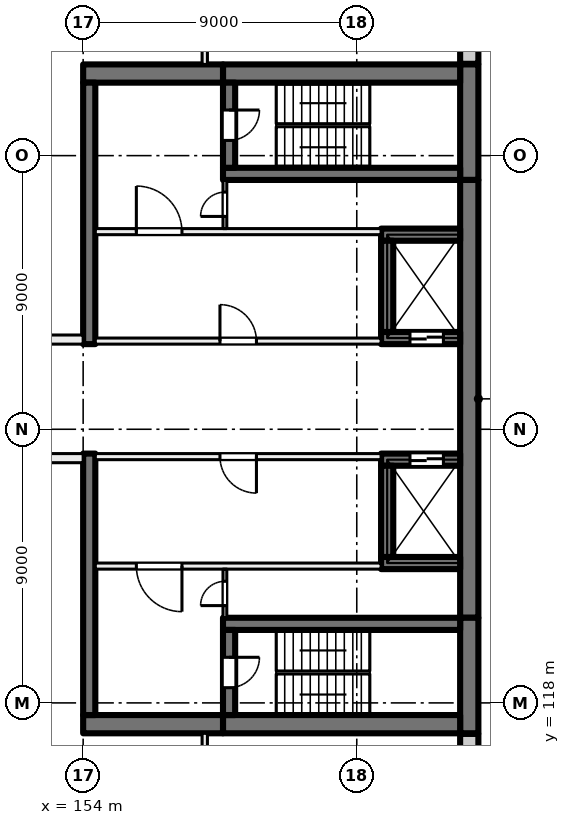
"""IFC4 building model, lengths in metres.
Left out: names, types, materials, properties, quantities, classifications, styles, units other than length and angle.
Written with IfcOpenShell. Run it as: python <this file> out.ifc"""

import sys

from ifc_helpers import new_model, si_unit, direction, frame, frame_2d, origin, place, context, subcontext, project, spatial, rectangle, extrude, element, fill, save


model = new_model("IFC4")
c1 = context("Model", 3, precision=1e-05, world=origin(), true_north=direction((0.0, 1.0)))
c2 = subcontext(c1, "Body", "Model", "MODEL_VIEW")
j1 = project(units=[si_unit("LENGTHUNIT", "METRE"), si_unit("PLANEANGLEUNIT", "RADIAN")], contexts=[c1])
p1 = place(None, origin())
s1 = spatial("IfcSite", under=j1, at=p1, CompositionType="ELEMENT")
p2 = place(p1, origin())
s2 = spatial("IfcBuilding", under=s1, at=p2, CompositionType="ELEMENT")
p3 = place(p2, frame((0.0, 0.0, 85.0)))
s3 = spatial("IfcBuildingStorey", under=s2, at=p3, CompositionType="ELEMENT", Elevation=85.0)
p4 = place(p3, frame((166.7, 139.0, 0.0), z_axis=(0.0, 0.0, 1.0), x_axis=(0.0, -1.0, 0.0)))
e1 = element("IfcWall", 1, at=p4, inside=s3, PredefinedType="SHEAR", context=c2, shape_type="SweptSolid", body=[
    extrude(rectangle(XDim=3.8, YDim=0.6, at=frame_2d((1.9, 0.0))), origin(), (0.0, 0.0, 1.0), 4.0),
])
p5 = place(p3, frame((166.7, 135.2, 0.0), z_axis=(0.0, 0.0, 1.0), x_axis=(0.0, -1.0, 0.0)))
e2 = element("IfcWall", 2, at=p5, inside=s3, PredefinedType="SHEAR", context=c2, shape_type="SweptSolid", body=[
    extrude(rectangle(XDim=14.4, YDim=0.6, at=frame_2d((7.2, 0.0))), origin(), (0.0, 0.0, 1.0), 4.0),
])
p6 = place(p3, frame((166.7, 120.8, 0.0), z_axis=(0.0, 0.0, 1.0), x_axis=(0.0, -1.0, 0.0)))
e3 = element("IfcWall", 3, at=p6, inside=s3, PredefinedType="SHEAR", context=c2, shape_type="SweptSolid", body=[
    extrude(rectangle(XDim=3.8, YDim=0.6, at=frame_2d((1.9, 0.0))), origin(), (0.0, 0.0, 1.0), 4.0),
])
for number, where, z_axis, x_axis in (
    (4, (166.4, 138.7, 0.0), (0.0, 0.0, 1.0), (-1.0, 0.0, 0.0)),
    (5, (166.4, 117.3, 0.0), (0.0, 0.0, 1.0), (-1.0, 0.0, 0.0)),
):
    element("IfcWall", number, at=place(p3, frame(where, z_axis=z_axis, x_axis=x_axis)), inside=s3, PredefinedType="SHEAR", context=c2, shape_type="SweptSolid", body=[
        extrude(rectangle(XDim=7.8, YDim=0.6, at=frame_2d((3.9, 0.0))), origin(), (0.0, 0.0, 1.0), 4.0),
    ])
for number, where, z_axis, x_axis in (
    (6, (158.6, 138.7, 0.0), (0.0, 0.0, 1.0), (-1.0, 0.0, 0.0)),
    (7, (158.6, 117.3, 0.0), (0.0, 0.0, 1.0), (-1.0, 0.0, 0.0)),
):
    element("IfcWall", number, at=place(p3, frame(where, z_axis=z_axis, x_axis=x_axis)), inside=s3, PredefinedType="SHEAR", context=c2, shape_type="SweptSolid", body=[
        extrude(rectangle(XDim=4.6, YDim=0.6, at=frame_2d((2.3, 0.0))), origin(), (0.0, 0.0, 1.0), 4.0),
    ])
p7 = place(p3, frame((166.4, 135.4, 0.0), z_axis=(0.0, 0.0, 1.0), x_axis=(-1.0, 0.0, 0.0)))
e8 = element("IfcWall", 8, at=p7, inside=s3, PredefinedType="SHEAR", context=c2, shape_type="SweptSolid", body=[
    extrude(rectangle(XDim=7.8, YDim=0.4, at=frame_2d((3.9, 0.0))), origin(), (0.0, 0.0, 1.0), 4.0),
])
p8 = place(p3, frame((158.8, 138.4, 0.0), z_axis=(0.0, 0.0, 1.0), x_axis=(0.0, -1.0, 0.0)))
e9 = element("IfcWall", 9, at=p8, inside=s3, PredefinedType="SHEAR", context=c2, shape_type="SweptSolid", body=[
    extrude(rectangle(XDim=2.8, YDim=0.4, at=frame_2d((1.4, 0.0))), origin(), (0.0, 0.0, 1.0), 4.0),
])
p9 = place(p8, frame((0.9, 0.0, 0.0)))
e10 = element("IfcOpeningElement", 10, at=p9, cuts=e9, PredefinedType="OPENING", context=c2, shape_type="SweptSolid", body=[
    extrude(rectangle(XDim=1.0, YDim=2.1, at=frame_2d((0.5, 1.05))), frame((0.0, 0.21, 0.0), z_axis=(0.0, -1.0, 0.0), x_axis=(1.0, 0.0, 0.0)), (0.0, 0.0, 1.0), 0.42),
])
p10 = place(p3, frame((166.4, 120.6, 0.0), z_axis=(0.0, 0.0, 1.0), x_axis=(-1.0, 0.0, 0.0)))
e11 = element("IfcWall", 11, at=p10, inside=s3, PredefinedType="SHEAR", context=c2, shape_type="SweptSolid", body=[
    extrude(rectangle(XDim=7.8, YDim=0.4, at=frame_2d((3.9, 0.0))), origin(), (0.0, 0.0, 1.0), 4.0),
])
p11 = place(p3, frame((158.8, 120.4, 0.0), z_axis=(0.0, 0.0, 1.0), x_axis=(0.0, -1.0, 0.0)))
e12 = element("IfcWall", 12, at=p11, inside=s3, PredefinedType="SHEAR", context=c2, shape_type="SweptSolid", body=[
    extrude(rectangle(XDim=2.8, YDim=0.4, at=frame_2d((1.4, 0.0))), origin(), (0.0, 0.0, 1.0), 4.0),
])
p12 = place(p11, frame((0.9, 0.0, 0.0)))
e13 = element("IfcOpeningElement", 13, at=p12, cuts=e12, PredefinedType="OPENING", context=c2, shape_type="SweptSolid", body=[
    extrude(rectangle(XDim=1.0, YDim=2.1, at=frame_2d((0.5, 1.05))), frame((0.0, 0.21, 0.0), z_axis=(0.0, -1.0, 0.0), x_axis=(1.0, 0.0, 0.0)), (0.0, 0.0, 1.0), 0.42),
])
p13 = place(p3, frame((166.4, 130.0, 0.0), z_axis=(0.0, 0.0, 1.0), x_axis=(-1.0, 0.0, 0.0)))
e14 = element("IfcWall", 14, at=p13, inside=s3, PredefinedType="SHEAR", context=c2, shape_type="SweptSolid", body=[
    extrude(rectangle(XDim=2.6, YDim=0.4, at=frame_2d((1.3, 0.0))), origin(), (0.0, 0.0, 1.0), 4.0),
])
p14 = place(p13, frame((0.55, 0.0, 0.0)))
e15 = element("IfcOpeningElement", 15, at=p14, cuts=e14, PredefinedType="OPENING", context=c2, shape_type="SweptSolid", body=[
    extrude(rectangle(XDim=1.1, YDim=2.1, at=frame_2d((0.55, 1.05))), frame((0.0, 0.21, 0.0), z_axis=(0.0, -1.0, 0.0), x_axis=(1.0, 0.0, 0.0)), (0.0, 0.0, 1.0), 0.42),
])
p15 = place(p3, frame((166.4, 133.4, 0.0), z_axis=(0.0, 0.0, 1.0), x_axis=(-1.0, 0.0, 0.0)))
e16 = element("IfcWall", 16, at=p15, inside=s3, PredefinedType="SHEAR", context=c2, shape_type="SweptSolid", body=[
    extrude(rectangle(XDim=2.6, YDim=0.4, at=frame_2d((1.3, 0.0))), origin(), (0.0, 0.0, 1.0), 4.0),
])
p16 = place(p3, frame((164.0, 133.2, 0.0), z_axis=(0.0, 0.0, 1.0), x_axis=(0.0, -1.0, 0.0)))
e17 = element("IfcWall", 17, at=p16, inside=s3, PredefinedType="SHEAR", context=c2, shape_type="SweptSolid", body=[
    extrude(rectangle(XDim=3.0, YDim=0.4, at=frame_2d((1.5, 0.0))), origin(), (0.0, 0.0, 1.0), 4.0),
])
p17 = place(p3, frame((166.4, 126.0, 0.0), z_axis=(0.0, 0.0, 1.0), x_axis=(-1.0, 0.0, 0.0)))
e18 = element("IfcWall", 18, at=p17, inside=s3, PredefinedType="SHEAR", context=c2, shape_type="SweptSolid", body=[
    extrude(rectangle(XDim=2.6, YDim=0.4, at=frame_2d((1.3, 0.0))), origin(), (0.0, 0.0, 1.0), 4.0),
])
p18 = place(p17, frame((0.55, 0.0, 0.0)))
e19 = element("IfcOpeningElement", 19, at=p18, cuts=e18, PredefinedType="OPENING", context=c2, shape_type="SweptSolid", body=[
    extrude(rectangle(XDim=1.1, YDim=2.1, at=frame_2d((0.55, 1.05))), frame((0.0, 0.21, 0.0), z_axis=(0.0, -1.0, 0.0), x_axis=(1.0, 0.0, 0.0)), (0.0, 0.0, 1.0), 0.42),
])
p19 = place(p3, frame((166.4, 122.6, 0.0), z_axis=(0.0, 0.0, 1.0), x_axis=(-1.0, 0.0, 0.0)))
e20 = element("IfcWall", 20, at=p19, inside=s3, PredefinedType="SHEAR", context=c2, shape_type="SweptSolid", body=[
    extrude(rectangle(XDim=2.6, YDim=0.4, at=frame_2d((1.3, 0.0))), origin(), (0.0, 0.0, 1.0), 4.0),
])
p20 = place(p3, frame((164.0, 125.8, 0.0), z_axis=(0.0, 0.0, 1.0), x_axis=(0.0, -1.0, 0.0)))
e21 = element("IfcWall", 21, at=p20, inside=s3, PredefinedType="SHEAR", context=c2, shape_type="SweptSolid", body=[
    extrude(rectangle(XDim=3.0, YDim=0.4, at=frame_2d((1.5, 0.0))), origin(), (0.0, 0.0, 1.0), 4.0),
])
for number, where, z_axis, x_axis in (
    (22, (154.2, 138.4, 0.0), (0.0, 0.0, 1.0), (0.0, -1.0, 0.0)),
    (23, (154.2, 126.2, 0.0), (0.0, 0.0, 1.0), (0.0, -1.0, 0.0)),
):
    element("IfcWall", number, at=place(p3, frame(where, z_axis=z_axis, x_axis=x_axis)), inside=s3, PredefinedType="SHEAR", context=c2, shape_type="SweptSolid", body=[
        extrude(rectangle(XDim=8.6, YDim=0.4, at=frame_2d((4.3, 0.0))), origin(), (0.0, 0.0, 1.0), 4.0),
    ])
p21 = place(p3, frame((166.7, 116.98, 0.0), z_axis=(0.0, 0.0, 1.0), x_axis=(0.0, -1.0, 0.0)))
e24 = element("IfcWall", 24, at=p21, inside=s3, PredefinedType="SOLIDWALL", context=c2, shape_type="SweptSolid", body=[
    extrude(rectangle(XDim=2.98, YDim=0.6, at=frame_2d((1.49, 0.0))), origin(), (0.0, 0.0, 1.0), 3.625),
])
p22 = place(p3, frame((166.7, 141.93, 0.0), z_axis=(0.0, 0.0, 1.0), x_axis=(0.0, -1.0, 0.0)))
e25 = element("IfcWall", 25, at=p22, inside=s3, PredefinedType="SOLIDWALL", context=c2, shape_type="SweptSolid", body=[
    extrude(rectangle(XDim=2.91, YDim=0.6, at=frame_2d((1.455, 0.0))), origin(), (0.0, 0.0, 1.0), 3.625),
])
p23 = place(p3, frame((163.8, 126.1, 0.0), z_axis=(0.0, 0.0, 1.0), x_axis=(-1.0, 0.0, 0.0)))
e26 = element("IfcWall", 26, at=p23, inside=s3, PredefinedType="PARTITIONING", context=c2, shape_type="SweptSolid", body=[
    extrude(rectangle(XDim=9.4, YDim=0.2, at=frame_2d((4.7, 0.0))), origin(), (0.0, 0.0, 1.0), 3.625),
])
p24 = place(p23, frame((4.1, 0.0, 0.0)))
e27 = element("IfcOpeningElement", 27, at=p24, cuts=e26, PredefinedType="OPENING", context=c2, shape_type="SweptSolid", body=[
    extrude(rectangle(XDim=1.2, YDim=2.1, at=frame_2d((0.6, 1.05))), frame((0.0, 0.11, 0.0), z_axis=(0.0, -1.0, 0.0), x_axis=(1.0, 0.0, 0.0)), (0.0, 0.0, 1.0), 0.22),
])
p25 = place(p3, frame((163.8, 122.5, 0.0), z_axis=(0.0, 0.0, 1.0), x_axis=(-1.0, 0.0, 0.0)))
e28 = element("IfcWall", 28, at=p25, inside=s3, PredefinedType="PARTITIONING", context=c2, shape_type="SweptSolid", body=[
    extrude(rectangle(XDim=9.4, YDim=0.2, at=frame_2d((4.7, 0.0))), origin(), (0.0, 0.0, 1.0), 3.625),
])
p26 = place(p25, frame((6.55, 0.0, 0.0)))
e29 = element("IfcOpeningElement", 29, at=p26, cuts=e28, PredefinedType="OPENING", context=c2, shape_type="SweptSolid", body=[
    extrude(rectangle(XDim=1.5, YDim=2.1, at=frame_2d((0.75, 1.05))), frame((0.0, 0.11, 0.0), z_axis=(0.0, -1.0, 0.0), x_axis=(1.0, 0.0, 0.0)), (0.0, 0.0, 1.0), 0.22),
])
p27 = place(p3, frame((158.663, 120.8, 0.0), z_axis=(0.0, 0.0, 1.0), x_axis=(0.0, 1.0, 0.0)))
e30 = element("IfcWall", 30, at=p27, inside=s3, PredefinedType="PARTITIONING", context=c2, shape_type="SweptSolid", body=[
    extrude(rectangle(XDim=1.6, YDim=0.125, at=frame_2d((0.8, 0.0))), origin(), (0.0, 0.0, 1.0), 3.625),
])
p28 = place(p27, frame((0.4, 0.0, 0.0)))
e31 = element("IfcOpeningElement", 31, at=p28, cuts=e30, PredefinedType="OPENING", context=c2, shape_type="SweptSolid", body=[
    extrude(rectangle(XDim=0.8, YDim=2.1, at=frame_2d((0.4, 1.05))), frame((0.0, 0.073, 0.0), z_axis=(0.0, -1.0, 0.0), x_axis=(1.0, 0.0, 0.0)), (0.0, 0.0, 1.0), 0.145),
])
p29 = place(p3, frame((154.4, 129.9, 0.0), z_axis=(0.0, 0.0, 1.0), x_axis=(1.0, 0.0, 0.0)))
e32 = element("IfcWall", 32, at=p29, inside=s3, PredefinedType="PARTITIONING", context=c2, shape_type="SweptSolid", body=[
    extrude(rectangle(XDim=9.4, YDim=0.2, at=frame_2d((4.7, 0.0))), origin(), (0.0, 0.0, 1.0), 3.625),
])
p30 = place(p29, frame((4.1, 0.0, 0.0)))
e33 = element("IfcOpeningElement", 33, at=p30, cuts=e32, PredefinedType="OPENING", context=c2, shape_type="SweptSolid", body=[
    extrude(rectangle(XDim=1.2, YDim=2.1, at=frame_2d((0.6, 1.05))), frame((0.0, 0.11, 0.0), z_axis=(0.0, -1.0, 0.0), x_axis=(1.0, 0.0, 0.0)), (0.0, 0.0, 1.0), 0.22),
])
p31 = place(p3, frame((154.4, 133.5, 0.0), z_axis=(0.0, 0.0, 1.0), x_axis=(1.0, 0.0, 0.0)))
e34 = element("IfcWall", 34, at=p31, inside=s3, PredefinedType="PARTITIONING", context=c2, shape_type="SweptSolid", body=[
    extrude(rectangle(XDim=9.4, YDim=0.2, at=frame_2d((4.7, 0.0))), origin(), (0.0, 0.0, 1.0), 3.625),
])
p32 = place(p31, frame((1.35, 0.0, 0.0)))
e35 = element("IfcOpeningElement", 35, at=p32, cuts=e34, PredefinedType="OPENING", context=c2, shape_type="SweptSolid", body=[
    extrude(rectangle(XDim=1.5, YDim=2.1, at=frame_2d((0.75, 1.05))), frame((0.0, 0.11, 0.0), z_axis=(0.0, -1.0, 0.0), x_axis=(1.0, 0.0, 0.0)), (0.0, 0.0, 1.0), 0.22),
])
p33 = place(p3, frame((158.663, 133.6, 0.0), z_axis=(0.0, 0.0, 1.0), x_axis=(0.0, 1.0, 0.0)))
e36 = element("IfcWall", 36, at=p33, inside=s3, PredefinedType="PARTITIONING", context=c2, shape_type="SweptSolid", body=[
    extrude(rectangle(XDim=1.6, YDim=0.125, at=frame_2d((0.8, 0.0))), origin(), (0.0, 0.0, 1.0), 3.625),
])
p34 = place(p33, frame((0.4, 0.0, 0.0)))
e37 = element("IfcOpeningElement", 37, at=p34, cuts=e36, PredefinedType="OPENING", context=c2, shape_type="SweptSolid", body=[
    extrude(rectangle(XDim=0.8, YDim=2.1, at=frame_2d((0.4, 1.05))), frame((0.0, 0.073, 0.0), z_axis=(0.0, -1.0, 0.0), x_axis=(1.0, 0.0, 0.0)), (0.0, 0.0, 1.0), 0.145),
])
p35 = place(p3, frame((140.0, 129.95, 0.0), z_axis=(0.0, 0.0, 1.0), x_axis=(1.0, 0.0, 0.0)))
e38 = element("IfcWall", 38, at=p35, inside=s3, PredefinedType="PARTITIONING", context=c2, shape_type="SweptSolid", body=[
    extrude(rectangle(XDim=14.0, YDim=0.3, at=frame_2d((7.0, 0.0))), origin(), (0.0, 0.0, 1.0), 3.625),
])
p36 = place(p35, frame((2.75, 0.0, 0.0)))
e39 = element("IfcOpeningElement", 39, at=p36, cuts=e38, PredefinedType="OPENING", context=c2, shape_type="SweptSolid", body=[
    extrude(rectangle(XDim=1.0, YDim=2.1, at=frame_2d((0.5, 1.05))), frame((0.0, 0.16, 0.0), z_axis=(0.0, -1.0, 0.0), x_axis=(1.0, 0.0, 0.0)), (0.0, 0.0, 1.0), 0.32),
])
p37 = place(p35, frame((10.6, 0.0, 0.0)))
e40 = element("IfcOpeningElement", 40, at=p37, cuts=e38, PredefinedType="OPENING", context=c2, shape_type="SweptSolid", body=[
    extrude(rectangle(XDim=1.8, YDim=2.1, at=frame_2d((0.9, 1.05))), frame((0.0, 0.16, 0.0), z_axis=(0.0, -1.0, 0.0), x_axis=(1.0, 0.0, 0.0)), (0.0, 0.0, 1.0), 0.32),
])
p38 = place(p3, frame((154.0, 126.05, 0.0), z_axis=(0.0, 0.0, 1.0), x_axis=(-1.0, 0.0, 0.0)))
e41 = element("IfcWall", 41, at=p38, inside=s3, PredefinedType="PARTITIONING", context=c2, shape_type="SweptSolid", body=[
    extrude(rectangle(XDim=14.0, YDim=0.3, at=frame_2d((7.0, 0.0))), origin(), (0.0, 0.0, 1.0), 3.625),
])
p39 = place(p38, frame((6.1, 0.0, 0.0)))
e42 = element("IfcOpeningElement", 42, at=p39, cuts=e41, PredefinedType="OPENING", context=c2, shape_type="SweptSolid", body=[
    extrude(rectangle(XDim=1.8, YDim=2.1, at=frame_2d((0.9, 1.05))), frame((0.0, 0.16, 0.0), z_axis=(0.0, -1.0, 0.0), x_axis=(1.0, 0.0, 0.0)), (0.0, 0.0, 1.0), 0.32),
])
p40 = place(p3, frame((158.0, 110.6, 0.0), z_axis=(0.0, 0.0, 1.0), x_axis=(0.0, 1.0, 0.0)))
e43 = element("IfcWall", 43, at=p40, inside=s3, PredefinedType="PARTITIONING", context=c2, shape_type="SweptSolid", body=[
    extrude(rectangle(XDim=6.4, YDim=0.175, at=frame_2d((3.2, 0.0))), origin(), (0.0, 0.0, 1.0), 3.625),
])
p41 = place(p40, frame((2.6, 0.0, 0.0)))
e44 = element("IfcOpeningElement", 44, at=p41, cuts=e43, PredefinedType="OPENING", context=c2, shape_type="SweptSolid", body=[
    extrude(rectangle(XDim=1.2, YDim=2.1, at=frame_2d((0.6, 1.05))), frame((0.0, 0.097, 0.0), z_axis=(0.0, -1.0, 0.0), x_axis=(1.0, 0.0, 0.0)), (0.0, 0.0, 1.0), 0.195),
])
p42 = place(p3, frame((158.0, 139.0, 0.0), z_axis=(0.0, 0.0, 1.0), x_axis=(0.0, 1.0, 0.0)))
e45 = element("IfcWall", 45, at=p42, inside=s3, PredefinedType="PARTITIONING", context=c2, shape_type="SweptSolid", body=[
    extrude(rectangle(XDim=6.4, YDim=0.175, at=frame_2d((3.2, 0.0))), origin(), (0.0, 0.0, 1.0), 3.625),
])
p43 = place(p42, frame((2.6, 0.0, 0.0)))
e46 = element("IfcOpeningElement", 46, at=p43, cuts=e45, PredefinedType="OPENING", context=c2, shape_type="SweptSolid", body=[
    extrude(rectangle(XDim=1.2, YDim=2.1, at=frame_2d((0.6, 1.05))), frame((0.0, 0.097, 0.0), z_axis=(0.0, -1.0, 0.0), x_axis=(1.0, 0.0, 0.0)), (0.0, 0.0, 1.0), 0.195),
])
p44 = place(p18, origin())
e47 = element("IfcDoor", 47, at=p44, inside=s3, OperationType="DOUBLE_DOOR_SLIDING", PredefinedType="DOOR", context=c2, shape_type="SweptSolid", body=[
    extrude(rectangle(XDim=1.1, YDim=2.1, at=frame_2d((0.55, 1.05))), frame((0.0, 0.025, 0.0), z_axis=(0.0, -1.0, 0.0), x_axis=(1.0, 0.0, 0.0)), (0.0, 0.0, 1.0), 0.05),
])
fill(e19, e47)
p45 = place(p14, origin())
e48 = element("IfcDoor", 48, at=p45, inside=s3, OperationType="DOUBLE_DOOR_SLIDING", PredefinedType="DOOR", context=c2, shape_type="SweptSolid", body=[
    extrude(rectangle(XDim=1.1, YDim=2.1, at=frame_2d((0.55, 1.05))), frame((0.0, 0.025, 0.0), z_axis=(0.0, -1.0, 0.0), x_axis=(1.0, 0.0, 0.0)), (0.0, 0.0, 1.0), 0.05),
])
fill(e15, e48)
p46 = place(p24, origin())
e49 = element("IfcDoor", 49, at=p46, inside=s3, OperationType="DOUBLE_DOOR_SINGLE_SWING", PredefinedType="DOOR", context=c2, shape_type="SweptSolid", body=[
    extrude(rectangle(XDim=1.2, YDim=2.1, at=frame_2d((0.6, 1.05))), frame((0.0, 0.025, 0.0), z_axis=(0.0, -1.0, 0.0), x_axis=(1.0, 0.0, 0.0)), (0.0, 0.0, 1.0), 0.05),
])
fill(e27, e49)
p47 = place(p26, origin())
e50 = element("IfcDoor", 50, at=p47, inside=s3, OperationType="DOUBLE_DOOR_SINGLE_SWING", PredefinedType="DOOR", context=c2, shape_type="SweptSolid", body=[
    extrude(rectangle(XDim=1.5, YDim=2.1, at=frame_2d((0.75, 1.05))), frame((0.0, 0.025, 0.0), z_axis=(0.0, -1.0, 0.0), x_axis=(1.0, 0.0, 0.0)), (0.0, 0.0, 1.0), 0.05),
])
fill(e29, e50)
p48 = place(p12, origin())
e51 = element("IfcDoor", 51, at=p48, inside=s3, OperationType="SINGLE_SWING_LEFT", PredefinedType="DOOR", context=c2, shape_type="SweptSolid", body=[
    extrude(rectangle(XDim=1.0, YDim=2.1, at=frame_2d((0.5, 1.05))), frame((0.0, 0.025, 0.0), z_axis=(0.0, -1.0, 0.0), x_axis=(1.0, 0.0, 0.0)), (0.0, 0.0, 1.0), 0.05),
])
fill(e13, e51)
p49 = place(p28, origin())
e52 = element("IfcDoor", 52, at=p49, inside=s3, OperationType="SINGLE_SWING_RIGHT", PredefinedType="DOOR", context=c2, shape_type="SweptSolid", body=[
    extrude(rectangle(XDim=0.8, YDim=2.1, at=frame_2d((0.4, 1.05))), frame((0.0, 0.025, 0.0), z_axis=(0.0, -1.0, 0.0), x_axis=(1.0, 0.0, 0.0)), (0.0, 0.0, 1.0), 0.05),
])
fill(e31, e52)
p50 = place(p30, origin())
e53 = element("IfcDoor", 53, at=p50, inside=s3, OperationType="DOUBLE_DOOR_SINGLE_SWING", PredefinedType="DOOR", context=c2, shape_type="SweptSolid", body=[
    extrude(rectangle(XDim=1.2, YDim=2.1, at=frame_2d((0.6, 1.05))), frame((0.0, 0.025, 0.0), z_axis=(0.0, -1.0, 0.0), x_axis=(1.0, 0.0, 0.0)), (0.0, 0.0, 1.0), 0.05),
])
fill(e33, e53)
p51 = place(p32, origin())
e54 = element("IfcDoor", 54, at=p51, inside=s3, OperationType="DOUBLE_DOOR_SINGLE_SWING", PredefinedType="DOOR", context=c2, shape_type="SweptSolid", body=[
    extrude(rectangle(XDim=1.5, YDim=2.1, at=frame_2d((0.75, 1.05))), frame((0.0, 0.025, 0.0), z_axis=(0.0, -1.0, 0.0), x_axis=(1.0, 0.0, 0.0)), (0.0, 0.0, 1.0), 0.05),
])
fill(e35, e54)
p52 = place(p9, origin())
e55 = element("IfcDoor", 55, at=p52, inside=s3, OperationType="SINGLE_SWING_RIGHT", PredefinedType="DOOR", context=c2, shape_type="SweptSolid", body=[
    extrude(rectangle(XDim=1.0, YDim=2.1, at=frame_2d((0.5, 1.05))), frame((0.0, 0.025, 0.0), z_axis=(0.0, -1.0, 0.0), x_axis=(1.0, 0.0, 0.0)), (0.0, 0.0, 1.0), 0.05),
])
fill(e10, e55)
p53 = place(p34, origin())
e56 = element("IfcDoor", 56, at=p53, inside=s3, OperationType="SINGLE_SWING_LEFT", PredefinedType="DOOR", context=c2, shape_type="SweptSolid", body=[
    extrude(rectangle(XDim=0.8, YDim=2.1, at=frame_2d((0.4, 1.05))), frame((0.0, 0.025, 0.0), z_axis=(0.0, -1.0, 0.0), x_axis=(1.0, 0.0, 0.0)), (0.0, 0.0, 1.0), 0.05),
])
fill(e37, e56)
save(model, sys.argv[1])
